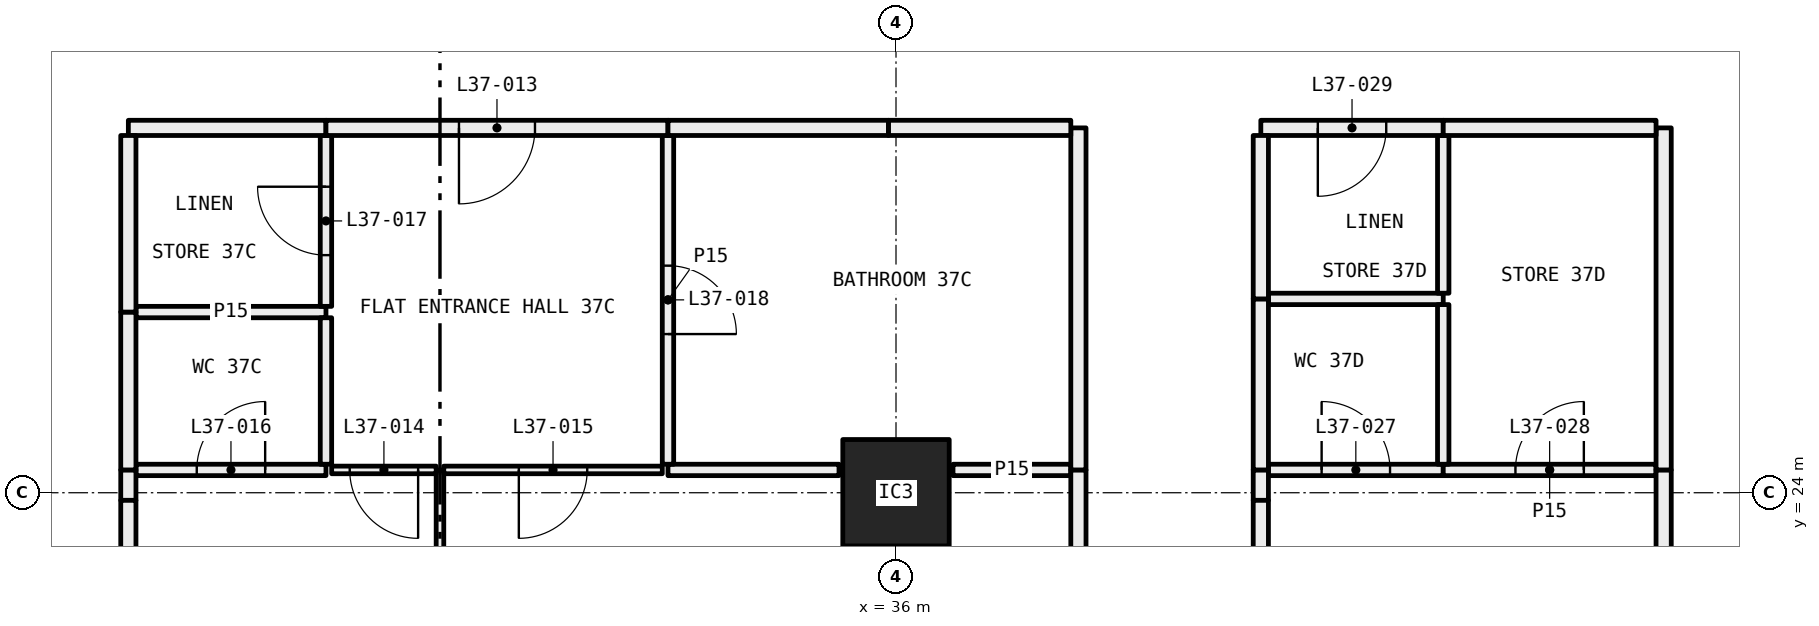
"""IFC4 building model, lengths in metres.
Left out: names, types, materials, properties, quantities, classifications, styles, units other than length and angle.
Written with IfcOpenShell. Run it as: python <this file> out.ifc"""

import sys

from ifc_helpers import new_model, si_unit, direction, frame, frame_2d, origin, origin_2d, place, context, subcontext, project, spatial, rectangle, hollow_rectangle, extrude, element, fill, save


model = new_model("IFC4")
c1 = context("Model", 3, precision=1e-05, world=origin(), true_north=direction((0.0, 1.0)))
c2 = subcontext(c1, "Body", "Model", "MODEL_VIEW")
j1 = project(units=[si_unit("LENGTHUNIT", "METRE"), si_unit("PLANEANGLEUNIT", "RADIAN")], contexts=[c1])
p1 = place(None, origin())
s1 = spatial("IfcSite", under=j1, at=p1, CompositionType="ELEMENT")
p2 = place(p1, origin())
s2 = spatial("IfcBuilding", under=s1, at=p2, CompositionType="ELEMENT")
p3 = place(p2, frame((0.0, 0.0, 141.45)))
s3 = spatial("IfcBuildingStorey", under=s2, at=p3, CompositionType="ELEMENT", Elevation=141.45)
p4 = place(p3, frame((36.0, 24.0, 0.0), z_axis=(0.0, 0.0, 1.0), x_axis=(1.0, 0.0, 0.0)))
e1 = element("IfcColumn", 1, at=p4, inside=s3, PredefinedType="COLUMN", context=c2, shape_type="SweptSolid", body=[
    extrude(hollow_rectangle(XDim=1.4, YDim=1.4, WallThickness=0.06, at=origin_2d()), origin(), (0.0, 0.0, 1.0), 3.05),
])
p5 = place(p3, frame((30.0, 18.1, 0.0), z_axis=(0.0, 0.0, 1.0), x_axis=(0.0, 1.0, 0.0)))
e2 = element("IfcWall", 2, at=p5, inside=s3, PredefinedType="PARTITIONING", context=c2, shape_type="SweptSolid", body=[
    extrude(rectangle(XDim=6.2, YDim=0.1, at=frame_2d((3.1, 0.0))), origin(), (0.0, 0.0, 1.0), 2.45),
])
p6 = place(p3, frame((28.5, 24.3, 0.0), z_axis=(0.0, 0.0, 1.0), x_axis=(-1.0, 0.0, 0.0)))
e3 = element("IfcWall", 3, at=p6, inside=s3, PredefinedType="PARTITIONING", context=c2, shape_type="SweptSolid", body=[
    extrude(rectangle(XDim=2.5, YDim=0.15, at=frame_2d((1.25, 0.0))), origin(), (0.0, 0.0, 1.0), 3.05),
])
p7 = place(p6, frame((0.8, 0.0, 0.0)))
e4 = element("IfcOpeningElement", 4, at=p7, cuts=e3, PredefinedType="OPENING", context=c2, shape_type="SweptSolid", body=[
    extrude(rectangle(XDim=0.9, YDim=2.1, at=frame_2d((0.45, 1.05))), frame((0.0, 0.085, 0.0), z_axis=(0.0, -1.0, 0.0), x_axis=(1.0, 0.0, 0.0)), (0.0, 0.0, 1.0), 0.17),
])
p8 = place(p3, frame((29.95, 24.3, 0.0), z_axis=(0.0, 0.0, 1.0), x_axis=(-1.0, 0.0, 0.0)))
e5 = element("IfcWall", 5, at=p8, inside=s3, PredefinedType="PARTITIONING", context=c2, shape_type="SweptSolid", body=[
    extrude(rectangle(XDim=1.375, YDim=0.1, at=frame_2d((0.688, 0.0))), origin(), (0.0, 0.0, 1.0), 3.05),
])
p9 = place(p8, frame((0.238, 0.0, 0.0)))
e6 = element("IfcOpeningElement", 6, at=p9, cuts=e5, PredefinedType="OPENING", context=c2, shape_type="SweptSolid", body=[
    extrude(rectangle(XDim=0.9, YDim=2.1, at=frame_2d((0.45, 1.05))), frame((0.0, 0.06, 0.0), z_axis=(0.0, -1.0, 0.0), x_axis=(1.0, 0.0, 0.0)), (0.0, 0.0, 1.0), 0.12),
])
p10 = place(p3, frame((25.9, 24.3, 0.0), z_axis=(0.0, 0.0, 1.0), x_axis=(0.0, -1.0, 0.0)))
e7 = element("IfcWall", 7, at=p10, inside=s3, PredefinedType="PARTITIONING", context=c2, shape_type="SweptSolid", body=[
    extrude(rectangle(XDim=0.4, YDim=0.2, at=frame_2d((0.2, 0.0))), origin(), (0.0, 0.0, 1.0), 2.45),
])
p11 = place(p3, frame((25.9, 23.9, 0.0), z_axis=(0.0, 0.0, 1.0), x_axis=(0.0, -1.0, 0.0)))
e8 = element("IfcWall", 8, at=p11, inside=s3, PredefinedType="PARTITIONING", context=c2, shape_type="SweptSolid", body=[
    extrude(rectangle(XDim=5.8, YDim=0.2, at=frame_2d((2.9, 0.0))), origin(), (0.0, 0.0, 1.0), 3.05),
])
p12 = place(p3, frame((32.925, 24.3, 0.0), z_axis=(0.0, 0.0, 1.0), x_axis=(-1.0, 0.0, 0.0)))
e9 = element("IfcWall", 9, at=p12, inside=s3, PredefinedType="PARTITIONING", context=c2, shape_type="SweptSolid", body=[
    extrude(rectangle(XDim=2.875, YDim=0.1, at=frame_2d((1.438, 0.0))), origin(), (0.0, 0.0, 1.0), 3.05),
])
p13 = place(p12, frame((0.988, 0.0, 0.0)))
e10 = element("IfcOpeningElement", 10, at=p13, cuts=e9, PredefinedType="OPENING", context=c2, shape_type="SweptSolid", body=[
    extrude(rectangle(XDim=0.9, YDim=2.1, at=frame_2d((0.45, 1.05))), frame((0.0, 0.06, 0.0), z_axis=(0.0, -1.0, 0.0), x_axis=(1.0, 0.0, 0.0)), (0.0, 0.0, 1.0), 0.12),
])
p14 = place(p3, frame((35.25, 24.3, 0.0), z_axis=(0.0, 0.0, 1.0), x_axis=(-1.0, 0.0, 0.0)))
e11 = element("IfcWall", 11, at=p14, inside=s3, PredefinedType="PARTITIONING", context=c2, shape_type="SweptSolid", body=[
    extrude(rectangle(XDim=2.25, YDim=0.15, at=frame_2d((1.125, 0.0))), origin(), (0.0, 0.0, 1.0), 3.05),
])
p15 = place(p3, frame((38.3, 24.3, 0.0), z_axis=(0.0, 0.0, 1.0), x_axis=(-1.0, 0.0, 0.0)))
e12 = element("IfcWall", 12, at=p15, inside=s3, PredefinedType="PARTITIONING", context=c2, shape_type="SweptSolid", body=[
    extrude(rectangle(XDim=1.55, YDim=0.15, at=frame_2d((0.775, 0.0))), origin(), (0.0, 0.0, 1.0), 3.05),
])
p16 = place(p3, frame((38.4, 18.1, 0.0), z_axis=(0.0, 0.0, 1.0), x_axis=(0.0, 1.0, 0.0)))
e13 = element("IfcWall", 13, at=p16, inside=s3, PredefinedType="PARTITIONING", context=c2, shape_type="SweptSolid", body=[
    extrude(rectangle(XDim=6.2, YDim=0.2, at=frame_2d((3.1, 0.0))), origin(), (0.0, 0.0, 1.0), 2.45),
])
p17 = place(p3, frame((28.5, 26.377, 0.0), z_axis=(0.0, 0.0, 1.0), x_axis=(-1.0, 0.0, 0.0)))
e14 = element("IfcWall", 14, at=p17, inside=s3, PredefinedType="PARTITIONING", context=c2, shape_type="SweptSolid", body=[
    extrude(rectangle(XDim=2.5, YDim=0.15, at=frame_2d((1.25, 0.0))), origin(), (0.0, 0.0, 1.0), 3.05),
])
p18 = place(p3, frame((28.5, 24.375, 0.0), z_axis=(0.0, 0.0, 1.0), x_axis=(0.0, 1.0, 0.0)))
e15 = element("IfcWall", 15, at=p18, inside=s3, PredefinedType="PARTITIONING", context=c2, shape_type="SweptSolid", body=[
    extrude(rectangle(XDim=1.927, YDim=0.15, at=frame_2d((0.963, 0.0))), origin(), (0.0, 0.0, 1.0), 3.05),
])
p19 = place(p3, frame((25.9, 26.377, 0.0), z_axis=(0.0, 0.0, 1.0), x_axis=(0.0, -1.0, 0.0)))
e16 = element("IfcWall", 16, at=p19, inside=s3, PredefinedType="PARTITIONING", context=c2, shape_type="SweptSolid", body=[
    extrude(rectangle(XDim=2.077, YDim=0.2, at=frame_2d((1.039, 0.0))), origin(), (0.0, 0.0, 1.0), 3.05),
])
p20 = place(p3, frame((28.5, 26.452, 0.0), z_axis=(0.0, 0.0, 1.0), x_axis=(0.0, 1.0, 0.0)))
e17 = element("IfcWall", 17, at=p20, inside=s3, PredefinedType="PARTITIONING", context=c2, shape_type="SweptSolid", body=[
    extrude(rectangle(XDim=2.248, YDim=0.15, at=frame_2d((1.124, 0.0))), origin(), (0.0, 0.0, 1.0), 3.05),
])
p21 = place(p20, frame((0.674, 0.0, 0.0)))
e18 = element("IfcOpeningElement", 18, at=p21, cuts=e17, PredefinedType="OPENING", context=c2, shape_type="SweptSolid", body=[
    extrude(rectangle(XDim=0.9, YDim=2.1, at=frame_2d((0.45, 1.05))), frame((0.0, 0.085, 0.0), z_axis=(0.0, -1.0, 0.0), x_axis=(1.0, 0.0, 0.0)), (0.0, 0.0, 1.0), 0.17),
])
p22 = place(p3, frame((28.5, 28.8, 0.0), z_axis=(0.0, 0.0, 1.0), x_axis=(-1.0, 0.0, 0.0)))
e19 = element("IfcWall", 19, at=p22, inside=s3, PredefinedType="PARTITIONING", context=c2, shape_type="SweptSolid", body=[
    extrude(rectangle(XDim=2.6, YDim=0.2, at=frame_2d((1.3, 0.0))), origin(), (0.0, 0.0, 1.0), 3.05),
])
p23 = place(p3, frame((25.9, 28.7, 0.0), z_axis=(0.0, 0.0, 1.0), x_axis=(0.0, -1.0, 0.0)))
e20 = element("IfcWall", 20, at=p23, inside=s3, PredefinedType="PARTITIONING", context=c2, shape_type="SweptSolid", body=[
    extrude(rectangle(XDim=2.323, YDim=0.2, at=frame_2d((1.162, 0.0))), origin(), (0.0, 0.0, 1.0), 3.05),
])
p24 = place(p3, frame((33.0, 24.375, 0.0), z_axis=(0.0, 0.0, 1.0), x_axis=(0.0, 1.0, 0.0)))
e21 = element("IfcWall", 21, at=p24, inside=s3, PredefinedType="PARTITIONING", context=c2, shape_type="SweptSolid", body=[
    extrude(rectangle(XDim=4.325, YDim=0.15, at=frame_2d((2.163, 0.0))), origin(), (0.0, 0.0, 1.0), 3.05),
])
p25 = place(p24, frame((1.712, 0.0, 0.0)))
e22 = element("IfcOpeningElement", 22, at=p25, cuts=e21, PredefinedType="OPENING", context=c2, shape_type="SweptSolid", body=[
    extrude(rectangle(XDim=0.9, YDim=2.1, at=frame_2d((0.45, 1.05))), frame((0.0, 0.085, 0.0), z_axis=(0.0, -1.0, 0.0), x_axis=(1.0, 0.0, 0.0)), (0.0, 0.0, 1.0), 0.17),
])
p26 = place(p3, frame((33.0, 28.8, 0.0), z_axis=(0.0, 0.0, 1.0), x_axis=(-1.0, 0.0, 0.0)))
e23 = element("IfcWall", 23, at=p26, inside=s3, PredefinedType="PARTITIONING", context=c2, shape_type="SweptSolid", body=[
    extrude(rectangle(XDim=4.5, YDim=0.2, at=frame_2d((2.25, 0.0))), origin(), (0.0, 0.0, 1.0), 3.05),
])
p27 = place(p26, frame((1.75, 0.0, 0.0)))
e24 = element("IfcOpeningElement", 24, at=p27, cuts=e23, PredefinedType="OPENING", context=c2, shape_type="SweptSolid", body=[
    extrude(rectangle(XDim=1.0, YDim=2.1, at=frame_2d((0.5, 1.05))), frame((0.0, 0.11, 0.0), z_axis=(0.0, -1.0, 0.0), x_axis=(1.0, 0.0, 0.0)), (0.0, 0.0, 1.0), 0.22),
])
p28 = place(p3, frame((38.4, 24.3, 0.0), z_axis=(0.0, 0.0, 1.0), x_axis=(0.0, 1.0, 0.0)))
e25 = element("IfcWall", 25, at=p28, inside=s3, PredefinedType="PARTITIONING", context=c2, shape_type="SweptSolid", body=[
    extrude(rectangle(XDim=4.5, YDim=0.2, at=frame_2d((2.25, 0.0))), origin(), (0.0, 0.0, 1.0), 3.05),
])
p29 = place(p3, frame((38.3, 28.8, 0.0), z_axis=(0.0, 0.0, 1.0), x_axis=(-1.0, 0.0, 0.0)))
e26 = element("IfcWall", 26, at=p29, inside=s3, PredefinedType="PARTITIONING", context=c2, shape_type="SweptSolid", body=[
    extrude(rectangle(XDim=2.4, YDim=0.2, at=frame_2d((1.2, 0.0))), origin(), (0.0, 0.0, 1.0), 2.45),
])
p30 = place(p3, frame((35.9, 28.8, 0.0), z_axis=(0.0, 0.0, 1.0), x_axis=(-1.0, 0.0, 0.0)))
e27 = element("IfcWall", 27, at=p30, inside=s3, PredefinedType="PARTITIONING", context=c2, shape_type="SweptSolid", body=[
    extrude(rectangle(XDim=2.9, YDim=0.2, at=frame_2d((1.45, 0.0))), origin(), (0.0, 0.0, 1.0), 3.05),
])
p31 = place(p3, frame((43.2, 24.3, 0.0), z_axis=(0.0, 0.0, 1.0), x_axis=(-1.0, 0.0, 0.0)))
e28 = element("IfcWall", 28, at=p31, inside=s3, PredefinedType="PARTITIONING", context=c2, shape_type="SweptSolid", body=[
    extrude(rectangle(XDim=2.3, YDim=0.15, at=frame_2d((1.15, 0.0))), origin(), (0.0, 0.0, 1.0), 3.05),
])
p32 = place(p31, frame((0.7, 0.0, 0.0)))
e29 = element("IfcOpeningElement", 29, at=p32, cuts=e28, PredefinedType="OPENING", context=c2, shape_type="SweptSolid", body=[
    extrude(rectangle(XDim=0.9, YDim=2.1, at=frame_2d((0.45, 1.05))), frame((0.0, 0.085, 0.0), z_axis=(0.0, -1.0, 0.0), x_axis=(1.0, 0.0, 0.0)), (0.0, 0.0, 1.0), 0.17),
])
p33 = place(p3, frame((46.0, 24.3, 0.0), z_axis=(0.0, 0.0, 1.0), x_axis=(-1.0, 0.0, 0.0)))
e30 = element("IfcWall", 30, at=p33, inside=s3, PredefinedType="PARTITIONING", context=c2, shape_type="SweptSolid", body=[
    extrude(rectangle(XDim=2.8, YDim=0.15, at=frame_2d((1.4, 0.0))), origin(), (0.0, 0.0, 1.0), 3.05),
])
p34 = place(p33, frame((0.95, 0.0, 0.0)))
e31 = element("IfcOpeningElement", 31, at=p34, cuts=e30, PredefinedType="OPENING", context=c2, shape_type="SweptSolid", body=[
    extrude(rectangle(XDim=0.9, YDim=2.1, at=frame_2d((0.45, 1.05))), frame((0.0, 0.085, 0.0), z_axis=(0.0, -1.0, 0.0), x_axis=(1.0, 0.0, 0.0)), (0.0, 0.0, 1.0), 0.17),
])
p35 = place(p3, frame((40.8, 24.3, 0.0), z_axis=(0.0, 0.0, 1.0), x_axis=(0.0, -1.0, 0.0)))
e32 = element("IfcWall", 32, at=p35, inside=s3, PredefinedType="PARTITIONING", context=c2, shape_type="SweptSolid", body=[
    extrude(rectangle(XDim=0.4, YDim=0.2, at=frame_2d((0.2, 0.0))), origin(), (0.0, 0.0, 1.0), 2.45),
])
p36 = place(p3, frame((40.8, 23.9, 0.0), z_axis=(0.0, 0.0, 1.0), x_axis=(0.0, -1.0, 0.0)))
e33 = element("IfcWall", 33, at=p36, inside=s3, PredefinedType="PARTITIONING", context=c2, shape_type="SweptSolid", body=[
    extrude(rectangle(XDim=5.8, YDim=0.2, at=frame_2d((2.9, 0.0))), origin(), (0.0, 0.0, 1.0), 3.05),
])
p37 = place(p3, frame((46.1, 18.1, 0.0), z_axis=(0.0, 0.0, 1.0), x_axis=(0.0, 1.0, 0.0)))
e34 = element("IfcWall", 34, at=p37, inside=s3, PredefinedType="PARTITIONING", context=c2, shape_type="SweptSolid", body=[
    extrude(rectangle(XDim=6.2, YDim=0.2, at=frame_2d((3.1, 0.0))), origin(), (0.0, 0.0, 1.0), 2.45),
])
p38 = place(p3, frame((43.2, 26.55, 0.0), z_axis=(0.0, 0.0, 1.0), x_axis=(-1.0, 0.0, 0.0)))
e35 = element("IfcWall", 35, at=p38, inside=s3, PredefinedType="PARTITIONING", context=c2, shape_type="SweptSolid", body=[
    extrude(rectangle(XDim=2.3, YDim=0.15, at=frame_2d((1.15, 0.0))), origin(), (0.0, 0.0, 1.0), 3.05),
])
p39 = place(p3, frame((43.2, 24.375, 0.0), z_axis=(0.0, 0.0, 1.0), x_axis=(0.0, 1.0, 0.0)))
e36 = element("IfcWall", 36, at=p39, inside=s3, PredefinedType="PARTITIONING", context=c2, shape_type="SweptSolid", body=[
    extrude(rectangle(XDim=2.1, YDim=0.15, at=frame_2d((1.05, 0.0))), origin(), (0.0, 0.0, 1.0), 3.05),
])
p40 = place(p3, frame((40.8, 26.55, 0.0), z_axis=(0.0, 0.0, 1.0), x_axis=(0.0, -1.0, 0.0)))
e37 = element("IfcWall", 37, at=p40, inside=s3, PredefinedType="PARTITIONING", context=c2, shape_type="SweptSolid", body=[
    extrude(rectangle(XDim=2.25, YDim=0.2, at=frame_2d((1.125, 0.0))), origin(), (0.0, 0.0, 1.0), 3.05),
])
p41 = place(p3, frame((43.2, 26.625, 0.0), z_axis=(0.0, 0.0, 1.0), x_axis=(0.0, 1.0, 0.0)))
e38 = element("IfcWall", 38, at=p41, inside=s3, PredefinedType="PARTITIONING", context=c2, shape_type="SweptSolid", body=[
    extrude(rectangle(XDim=2.075, YDim=0.15, at=frame_2d((1.038, 0.0))), origin(), (0.0, 0.0, 1.0), 3.05),
])
p42 = place(p3, frame((43.2, 28.8, 0.0), z_axis=(0.0, 0.0, 1.0), x_axis=(-1.0, 0.0, 0.0)))
e39 = element("IfcWall", 39, at=p42, inside=s3, PredefinedType="PARTITIONING", context=c2, shape_type="SweptSolid", body=[
    extrude(rectangle(XDim=2.4, YDim=0.2, at=frame_2d((1.2, 0.0))), origin(), (0.0, 0.0, 1.0), 3.05),
])
p43 = place(p42, frame((0.75, 0.0, 0.0)))
e40 = element("IfcOpeningElement", 40, at=p43, cuts=e39, PredefinedType="OPENING", context=c2, shape_type="SweptSolid", body=[
    extrude(rectangle(XDim=0.9, YDim=2.1, at=frame_2d((0.45, 1.05))), frame((0.0, 0.11, 0.0), z_axis=(0.0, -1.0, 0.0), x_axis=(1.0, 0.0, 0.0)), (0.0, 0.0, 1.0), 0.22),
])
p44 = place(p3, frame((40.8, 28.7, 0.0), z_axis=(0.0, 0.0, 1.0), x_axis=(0.0, -1.0, 0.0)))
e41 = element("IfcWall", 41, at=p44, inside=s3, PredefinedType="PARTITIONING", context=c2, shape_type="SweptSolid", body=[
    extrude(rectangle(XDim=2.15, YDim=0.2, at=frame_2d((1.075, 0.0))), origin(), (0.0, 0.0, 1.0), 3.05),
])
p45 = place(p3, frame((46.1, 24.3, 0.0), z_axis=(0.0, 0.0, 1.0), x_axis=(0.0, 1.0, 0.0)))
e42 = element("IfcWall", 42, at=p45, inside=s3, PredefinedType="PARTITIONING", context=c2, shape_type="SweptSolid", body=[
    extrude(rectangle(XDim=4.5, YDim=0.2, at=frame_2d((2.25, 0.0))), origin(), (0.0, 0.0, 1.0), 3.05),
])
p46 = place(p3, frame((46.0, 28.8, 0.0), z_axis=(0.0, 0.0, 1.0), x_axis=(-1.0, 0.0, 0.0)))
e43 = element("IfcWall", 43, at=p46, inside=s3, PredefinedType="PARTITIONING", context=c2, shape_type="SweptSolid", body=[
    extrude(rectangle(XDim=2.8, YDim=0.2, at=frame_2d((1.4, 0.0))), origin(), (0.0, 0.0, 1.0), 3.05),
])
p47 = place(p27, origin())
e44 = element("IfcDoor", 44, at=p47, inside=s3, OperationType="SINGLE_SWING_LEFT", PredefinedType="DOOR", context=c2, shape_type="SweptSolid", body=[
    extrude(rectangle(XDim=1.0, YDim=2.1, at=frame_2d((0.5, 1.05))), frame((0.0, 0.025, 0.0), z_axis=(0.0, -1.0, 0.0), x_axis=(1.0, 0.0, 0.0)), (0.0, 0.0, 1.0), 0.05),
])
fill(e24, e44)
p48 = place(p9, origin())
e45 = element("IfcDoor", 45, at=p48, inside=s3, OperationType="SINGLE_SWING_RIGHT", PredefinedType="DOOR", context=c2, shape_type="SweptSolid", body=[
    extrude(rectangle(XDim=0.9, YDim=2.1, at=frame_2d((0.45, 1.05))), frame((0.0, 0.025, 0.0), z_axis=(0.0, -1.0, 0.0), x_axis=(1.0, 0.0, 0.0)), (0.0, 0.0, 1.0), 0.05),
])
fill(e6, e45)
p49 = place(p13, origin())
e46 = element("IfcDoor", 46, at=p49, inside=s3, OperationType="SINGLE_SWING_LEFT", PredefinedType="DOOR", context=c2, shape_type="SweptSolid", body=[
    extrude(rectangle(XDim=0.9, YDim=2.1, at=frame_2d((0.45, 1.05))), frame((0.0, 0.025, 0.0), z_axis=(0.0, -1.0, 0.0), x_axis=(1.0, 0.0, 0.0)), (0.0, 0.0, 1.0), 0.05),
])
fill(e10, e46)
p50 = place(p7, frame((0.9, 0.0, 0.0), x_axis=(-1.0, 0.0, 0.0)))
e47 = element("IfcDoor", 47, at=p50, inside=s3, OperationType="SINGLE_SWING_LEFT", PredefinedType="DOOR", context=c2, shape_type="SweptSolid", body=[
    extrude(rectangle(XDim=0.9, YDim=2.1, at=frame_2d((0.45, 1.05))), frame((0.0, 0.025, 0.0), z_axis=(0.0, -1.0, 0.0), x_axis=(1.0, 0.0, 0.0)), (0.0, 0.0, 1.0), 0.05),
])
fill(e4, e47)
p51 = place(p21, origin())
e48 = element("IfcDoor", 48, at=p51, inside=s3, OperationType="SINGLE_SWING_LEFT", PredefinedType="DOOR", context=c2, shape_type="SweptSolid", body=[
    extrude(rectangle(XDim=0.9, YDim=2.1, at=frame_2d((0.45, 1.05))), frame((0.0, 0.025, 0.0), z_axis=(0.0, -1.0, 0.0), x_axis=(1.0, 0.0, 0.0)), (0.0, 0.0, 1.0), 0.05),
])
fill(e18, e48)
p52 = place(p25, frame((0.9, 0.0, 0.0), x_axis=(-1.0, 0.0, 0.0)))
e49 = element("IfcDoor", 49, at=p52, inside=s3, OperationType="SINGLE_SWING_LEFT", PredefinedType="DOOR", context=c2, shape_type="SweptSolid", body=[
    extrude(rectangle(XDim=0.9, YDim=2.1, at=frame_2d((0.45, 1.05))), frame((0.0, 0.025, 0.0), z_axis=(0.0, -1.0, 0.0), x_axis=(1.0, 0.0, 0.0)), (0.0, 0.0, 1.0), 0.05),
])
fill(e22, e49)
p53 = place(p32, frame((0.9, 0.0, 0.0), x_axis=(-1.0, 0.0, 0.0)))
e50 = element("IfcDoor", 50, at=p53, inside=s3, OperationType="SINGLE_SWING_RIGHT", PredefinedType="DOOR", context=c2, shape_type="SweptSolid", body=[
    extrude(rectangle(XDim=0.9, YDim=2.1, at=frame_2d((0.45, 1.05))), frame((0.0, 0.025, 0.0), z_axis=(0.0, -1.0, 0.0), x_axis=(1.0, 0.0, 0.0)), (0.0, 0.0, 1.0), 0.05),
])
fill(e29, e50)
p54 = place(p34, frame((0.9, 0.0, 0.0), x_axis=(-1.0, 0.0, 0.0)))
e51 = element("IfcDoor", 51, at=p54, inside=s3, OperationType="SINGLE_SWING_LEFT", PredefinedType="DOOR", context=c2, shape_type="SweptSolid", body=[
    extrude(rectangle(XDim=0.9, YDim=2.1, at=frame_2d((0.45, 1.05))), frame((0.0, 0.025, 0.0), z_axis=(0.0, -1.0, 0.0), x_axis=(1.0, 0.0, 0.0)), (0.0, 0.0, 1.0), 0.05),
])
fill(e31, e51)
p55 = place(p43, origin())
e52 = element("IfcDoor", 52, at=p55, inside=s3, OperationType="SINGLE_SWING_LEFT", PredefinedType="DOOR", context=c2, shape_type="SweptSolid", body=[
    extrude(rectangle(XDim=0.9, YDim=2.1, at=frame_2d((0.45, 1.05))), frame((0.0, 0.025, 0.0), z_axis=(0.0, -1.0, 0.0), x_axis=(1.0, 0.0, 0.0)), (0.0, 0.0, 1.0), 0.05),
])
fill(e40, e52)
save(model, sys.argv[1])
